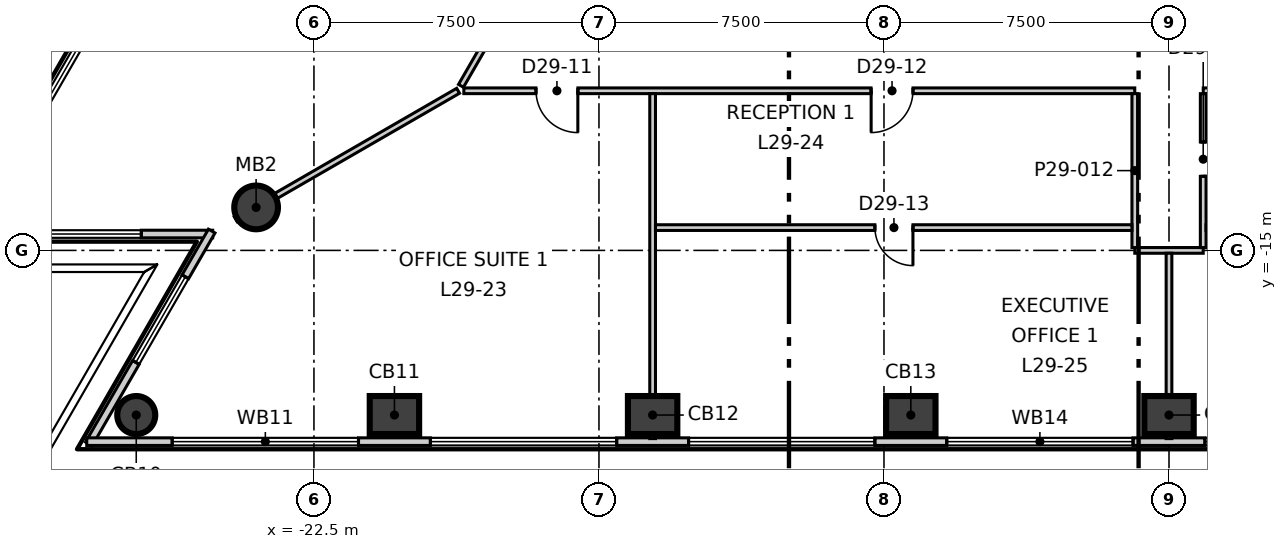
"""IFC4 building model, lengths in metres.
Left out: names, types, materials, properties, quantities, classifications, styles, units other than length and angle.
Written with IfcOpenShell. Run it as: python <this file> out.ifc"""

import sys

from ifc_helpers import new_model, si_unit, direction, frame, frame_2d, origin, origin_2d, place, context, subcontext, project, spatial, rectangle, circle, extrude, element, fill, save


model = new_model("IFC4")
c1 = context("Model", 3, precision=1e-05, world=origin(), true_north=direction((0.0, 1.0)))
c2 = subcontext(c1, "Body", "Model", "MODEL_VIEW")
j1 = project(units=[si_unit("LENGTHUNIT", "METRE"), si_unit("PLANEANGLEUNIT", "RADIAN")], contexts=[c1])
p1 = place(None, origin())
s1 = spatial("IfcSite", under=j1, at=p1, CompositionType="ELEMENT")
p2 = place(p1, origin())
s2 = spatial("IfcBuilding", under=s1, at=p2, CompositionType="ELEMENT")
p3 = place(p2, frame((0.0, 0.0, 128.3)))
s3 = spatial("IfcBuildingStorey", under=s2, at=p3, CompositionType="ELEMENT", Elevation=128.3)
p4 = place(p3, frame((-27.176, -19.332, -0.3), z_axis=(0.0, 0.0, 1.0), x_axis=(1.0, 0.0, 0.0)))
e1 = element("IfcColumn", 1, at=p4, inside=s3, PredefinedType="COLUMN", context=c2, shape_type="SweptSolid", body=[
    extrude(circle(Radius=0.5, at=origin_2d()), origin(), (0.0, 0.0, 1.0), 4.0),
])
for number, where, z_axis, x_axis in (
    (2, (-20.382, -19.332, -0.3), (0.0, 0.0, 1.0), (1.0, 0.0, 0.0)),
    (3, (-13.588, -19.332, -0.3), (0.0, 0.0, 1.0), (1.0, 0.0, 0.0)),
    (4, (-6.794, -19.332, -0.3), (0.0, 0.0, 1.0), (1.0, 0.0, 0.0)),
    (5, (0.0, -19.332, -0.3), (0.0, 0.0, 1.0), (1.0, 0.0, 0.0)),
):
    element("IfcColumn", number, at=place(p3, frame(where, z_axis=z_axis, x_axis=x_axis)), inside=s3, PredefinedType="COLUMN", context=c2, shape_type="SweptSolid", body=[
        extrude(rectangle(XDim=1.3, YDim=1.0, at=origin_2d()), origin(), (0.0, 0.0, 1.0), 4.0),
    ])
p5 = place(p3, frame((-24.022, -13.869, -0.3), z_axis=(0.0, 0.0, 1.0), x_axis=(1.0, 0.0, 0.0)))
e6 = element("IfcColumn", 6, at=p5, inside=s3, PredefinedType="COLUMN", context=c2, shape_type="SweptSolid", body=[
    extrude(circle(Radius=0.575, at=origin_2d()), origin(), (0.0, 0.0, 1.0), 4.0),
])
p6 = place(p3, frame((-3.109, 34.679, 0.0), z_axis=(0.0, 0.0, 1.0), x_axis=(-0.50000689325, -0.866021423928, 0.0)))
e7 = element("IfcWall", 7, at=p6, inside=s3, PredefinedType="ELEMENTEDWALL", context=c2, shape_type="SweptSolid", body=[
    extrude(rectangle(XDim=56.937, YDim=0.2, at=frame_2d((28.469, 0.0))), origin(), (0.0, 0.0, 1.0), 3.7),
])
p7 = place(p6, frame((2.249, 0.0, 0.9)))
e8 = element("IfcOpeningElement", 8, at=p7, cuts=e7, PredefinedType="OPENING", context=c2, shape_type="SweptSolid", body=[
    extrude(rectangle(XDim=4.9, YDim=2.5, at=frame_2d((2.45, 1.25))), frame((0.0, 0.11, 0.0), z_axis=(0.0, -1.0, 0.0), x_axis=(1.0, 0.0, 0.0)), (0.0, 0.0, 1.0), 0.22),
])
p8 = place(p6, frame((9.043, 0.0, 0.9)))
e9 = element("IfcOpeningElement", 9, at=p8, cuts=e7, PredefinedType="OPENING", context=c2, shape_type="SweptSolid", body=[
    extrude(rectangle(XDim=4.9, YDim=2.5, at=frame_2d((2.45, 1.25))), frame((0.0, 0.11, 0.0), z_axis=(0.0, -1.0, 0.0), x_axis=(1.0, 0.0, 0.0)), (0.0, 0.0, 1.0), 0.22),
])
p9 = place(p6, frame((15.837, 0.0, 0.9)))
e10 = element("IfcOpeningElement", 10, at=p9, cuts=e7, PredefinedType="OPENING", context=c2, shape_type="SweptSolid", body=[
    extrude(rectangle(XDim=4.9, YDim=2.5, at=frame_2d((2.45, 1.25))), frame((0.0, 0.11, 0.0), z_axis=(0.0, -1.0, 0.0), x_axis=(1.0, 0.0, 0.0)), (0.0, 0.0, 1.0), 0.22),
])
p10 = place(p6, frame((22.631, 0.0, 0.9)))
e11 = element("IfcOpeningElement", 11, at=p10, cuts=e7, PredefinedType="OPENING", context=c2, shape_type="SweptSolid", body=[
    extrude(rectangle(XDim=4.9, YDim=2.5, at=frame_2d((2.45, 1.25))), frame((0.0, 0.11, 0.0), z_axis=(0.0, -1.0, 0.0), x_axis=(1.0, 0.0, 0.0)), (0.0, 0.0, 1.0), 0.22),
])
p11 = place(p6, frame((29.425, 0.0, 0.9)))
e12 = element("IfcOpeningElement", 12, at=p11, cuts=e7, PredefinedType="OPENING", context=c2, shape_type="SweptSolid", body=[
    extrude(rectangle(XDim=4.9, YDim=2.5, at=frame_2d((2.45, 1.25))), frame((0.0, 0.11, 0.0), z_axis=(0.0, -1.0, 0.0), x_axis=(1.0, 0.0, 0.0)), (0.0, 0.0, 1.0), 0.22),
])
p12 = place(p6, frame((36.219, 0.0, 0.9)))
e13 = element("IfcOpeningElement", 13, at=p12, cuts=e7, PredefinedType="OPENING", context=c2, shape_type="SweptSolid", body=[
    extrude(rectangle(XDim=4.9, YDim=2.5, at=frame_2d((2.45, 1.25))), frame((0.0, 0.11, 0.0), z_axis=(0.0, -1.0, 0.0), x_axis=(1.0, 0.0, 0.0)), (0.0, 0.0, 1.0), 0.22),
])
p13 = place(p6, frame((43.013, 0.0, 0.9)))
e14 = element("IfcOpeningElement", 14, at=p13, cuts=e7, PredefinedType="OPENING", context=c2, shape_type="SweptSolid", body=[
    extrude(rectangle(XDim=4.9, YDim=2.5, at=frame_2d((2.45, 1.25))), frame((0.0, 0.11, 0.0), z_axis=(0.0, -1.0, 0.0), x_axis=(1.0, 0.0, 0.0)), (0.0, 0.0, 1.0), 0.22),
])
p14 = place(p6, frame((49.807, 0.0, 0.9)))
e15 = element("IfcOpeningElement", 15, at=p14, cuts=e7, PredefinedType="OPENING", context=c2, shape_type="SweptSolid", body=[
    extrude(rectangle(XDim=4.9, YDim=2.5, at=frame_2d((2.45, 1.25))), frame((0.0, 0.11, 0.0), z_axis=(0.0, -1.0, 0.0), x_axis=(1.0, 0.0, 0.0)), (0.0, 0.0, 1.0), 0.22),
])
p15 = place(p3, frame((-31.633, -14.569, 0.0), z_axis=(0.0, 0.0, 1.0), x_axis=(1.0, 0.0, 0.0)))
e16 = element("IfcWall", 16, at=p15, inside=s3, PredefinedType="ELEMENTEDWALL", context=c2, shape_type="SweptSolid", body=[
    extrude(rectangle(XDim=6.468, YDim=0.2, at=frame_2d((3.234, 0.0))), origin(), (0.0, 0.0, 1.0), 3.7),
])
p16 = place(p15, frame((1.99, 0.0, 0.9)))
e17 = element("IfcOpeningElement", 17, at=p16, cuts=e16, PredefinedType="OPENING", context=c2, shape_type="SweptSolid", body=[
    extrude(rectangle(XDim=2.6, YDim=2.5, at=frame_2d((1.3, 1.25))), frame((0.0, 0.11, 0.0), z_axis=(0.0, -1.0, 0.0), x_axis=(1.0, 0.0, 0.0)), (0.0, 0.0, 1.0), 0.22),
])
p17 = place(p3, frame((-25.19, -14.491, 0.0), z_axis=(0.0, 0.0, 1.0), x_axis=(-0.499975110204, -0.866039773438, 0.0)))
e18 = element("IfcWall", 18, at=p17, inside=s3, PredefinedType="ELEMENTEDWALL", context=c2, shape_type="SweptSolid", body=[
    extrude(rectangle(XDim=6.469, YDim=0.2, at=frame_2d((3.234, 0.0))), origin(), (0.0, 0.0, 1.0), 3.7),
])
p18 = place(p17, frame((1.39, 0.0, 0.9)))
e19 = element("IfcOpeningElement", 19, at=p18, cuts=e18, PredefinedType="OPENING", context=c2, shape_type="SweptSolid", body=[
    extrude(rectangle(XDim=2.6, YDim=2.5, at=frame_2d((1.3, 1.25))), frame((0.0, 0.11, 0.0), z_axis=(0.0, -1.0, 0.0), x_axis=(1.0, 0.0, 0.0)), (0.0, 0.0, 1.0), 0.22),
])
p19 = place(p3, frame((-28.479, -20.032, 0.0), z_axis=(0.0, 0.0, 1.0), x_axis=(1.0, 0.0, 0.0)))
e20 = element("IfcWall", 20, at=p19, inside=s3, PredefinedType="ELEMENTEDWALL", context=c2, shape_type="SweptSolid", body=[
    extrude(rectangle(XDim=56.938, YDim=0.2, at=frame_2d((28.469, 0.0))), origin(), (0.0, 0.0, 1.0), 3.7),
])
p20 = place(p19, frame((2.25, 0.0, 0.9)))
e21 = element("IfcOpeningElement", 21, at=p20, cuts=e20, PredefinedType="OPENING", context=c2, shape_type="SweptSolid", body=[
    extrude(rectangle(XDim=4.9, YDim=2.5, at=frame_2d((2.45, 1.25))), frame((0.0, 0.11, 0.0), z_axis=(0.0, -1.0, 0.0), x_axis=(1.0, 0.0, 0.0)), (0.0, 0.0, 1.0), 0.22),
])
p21 = place(p19, frame((9.044, 0.0, 0.9)))
e22 = element("IfcOpeningElement", 22, at=p21, cuts=e20, PredefinedType="OPENING", context=c2, shape_type="SweptSolid", body=[
    extrude(rectangle(XDim=4.9, YDim=2.5, at=frame_2d((2.45, 1.25))), frame((0.0, 0.11, 0.0), z_axis=(0.0, -1.0, 0.0), x_axis=(1.0, 0.0, 0.0)), (0.0, 0.0, 1.0), 0.22),
])
p22 = place(p19, frame((15.838, 0.0, 0.9)))
e23 = element("IfcOpeningElement", 23, at=p22, cuts=e20, PredefinedType="OPENING", context=c2, shape_type="SweptSolid", body=[
    extrude(rectangle(XDim=4.9, YDim=2.5, at=frame_2d((2.45, 1.25))), frame((0.0, 0.11, 0.0), z_axis=(0.0, -1.0, 0.0), x_axis=(1.0, 0.0, 0.0)), (0.0, 0.0, 1.0), 0.22),
])
p23 = place(p19, frame((22.632, 0.0, 0.9)))
e24 = element("IfcOpeningElement", 24, at=p23, cuts=e20, PredefinedType="OPENING", context=c2, shape_type="SweptSolid", body=[
    extrude(rectangle(XDim=4.9, YDim=2.5, at=frame_2d((2.45, 1.25))), frame((0.0, 0.11, 0.0), z_axis=(0.0, -1.0, 0.0), x_axis=(1.0, 0.0, 0.0)), (0.0, 0.0, 1.0), 0.22),
])
p24 = place(p19, frame((29.426, 0.0, 0.9)))
e25 = element("IfcOpeningElement", 25, at=p24, cuts=e20, PredefinedType="OPENING", context=c2, shape_type="SweptSolid", body=[
    extrude(rectangle(XDim=4.9, YDim=2.5, at=frame_2d((2.45, 1.25))), frame((0.0, 0.11, 0.0), z_axis=(0.0, -1.0, 0.0), x_axis=(1.0, 0.0, 0.0)), (0.0, 0.0, 1.0), 0.22),
])
p25 = place(p19, frame((36.22, 0.0, 0.9)))
e26 = element("IfcOpeningElement", 26, at=p25, cuts=e20, PredefinedType="OPENING", context=c2, shape_type="SweptSolid", body=[
    extrude(rectangle(XDim=4.9, YDim=2.5, at=frame_2d((2.45, 1.25))), frame((0.0, 0.11, 0.0), z_axis=(0.0, -1.0, 0.0), x_axis=(1.0, 0.0, 0.0)), (0.0, 0.0, 1.0), 0.22),
])
p26 = place(p19, frame((43.014, 0.0, 0.9)))
e27 = element("IfcOpeningElement", 27, at=p26, cuts=e20, PredefinedType="OPENING", context=c2, shape_type="SweptSolid", body=[
    extrude(rectangle(XDim=4.9, YDim=2.5, at=frame_2d((2.45, 1.25))), frame((0.0, 0.11, 0.0), z_axis=(0.0, -1.0, 0.0), x_axis=(1.0, 0.0, 0.0)), (0.0, 0.0, 1.0), 0.22),
])
p27 = place(p19, frame((49.808, 0.0, 0.9)))
e28 = element("IfcOpeningElement", 28, at=p27, cuts=e20, PredefinedType="OPENING", context=c2, shape_type="SweptSolid", body=[
    extrude(rectangle(XDim=4.9, YDim=2.5, at=frame_2d((2.45, 1.25))), frame((0.0, 0.11, 0.0), z_axis=(0.0, -1.0, 0.0), x_axis=(1.0, 0.0, 0.0)), (0.0, 0.0, 1.0), 0.22),
])
p28 = place(p3, frame((-24.559, -14.179, 0.0), z_axis=(0.0, 0.0, 1.0), x_axis=(0.866047229553, 0.499962194753, 0.0)))
e29 = element("IfcWall", 29, at=p28, inside=s3, PredefinedType="PARTITIONING", context=c2, shape_type="SweptSolid", body=[
    extrude(rectangle(XDim=6.758, YDim=0.15, at=frame_2d((3.379, 0.0))), origin(), (0.0, 0.0, 1.0), 3.15),
])
p29 = place(p3, frame((-18.556, -10.8, 0.0), z_axis=(0.0, 0.0, 1.0), x_axis=(1.0, 0.0, 0.0)))
e30 = element("IfcWall", 30, at=p29, inside=s3, PredefinedType="PARTITIONING", context=c2, shape_type="SweptSolid", body=[
    extrude(rectangle(XDim=17.655, YDim=0.15, at=frame_2d((8.828, 0.0))), origin(), (0.0, 0.0, 1.0), 3.7),
])
p30 = place(p29, frame((1.9, 0.0, 0.0)))
e31 = element("IfcOpeningElement", 31, at=p30, cuts=e30, PredefinedType="OPENING", context=c2, shape_type="SweptSolid", body=[
    extrude(rectangle(XDim=1.1, YDim=2.1, at=frame_2d((0.55, 1.05))), frame((0.0, 0.085, 0.0), z_axis=(0.0, -1.0, 0.0), x_axis=(1.0, 0.0, 0.0)), (0.0, 0.0, 1.0), 0.17),
])
p31 = place(p29, frame((10.718, 0.0, 0.0)))
e32 = element("IfcOpeningElement", 32, at=p31, cuts=e30, PredefinedType="OPENING", context=c2, shape_type="SweptSolid", body=[
    extrude(rectangle(XDim=1.1, YDim=2.1, at=frame_2d((0.55, 1.05))), frame((0.0, 0.085, 0.0), z_axis=(0.0, -1.0, 0.0), x_axis=(1.0, 0.0, 0.0)), (0.0, 0.0, 1.0), 0.17),
])
p32 = place(p3, frame((0.901, -10.8, 0.0), z_axis=(0.0, 0.0, 1.0), x_axis=(1.0, 0.0, 0.0)))
e33 = element("IfcWall", 33, at=p32, inside=s3, PredefinedType="PARTITIONING", context=c2, shape_type="SweptSolid", body=[
    extrude(rectangle(XDim=17.805, YDim=0.15, at=frame_2d((8.903, 0.0))), origin(), (0.0, 0.0, 1.0), 3.7),
])
p33 = place(p32, frame((10.149, 0.0, 0.0)))
e34 = element("IfcOpeningElement", 34, at=p33, cuts=e33, PredefinedType="OPENING", context=c2, shape_type="SweptSolid", body=[
    extrude(rectangle(XDim=1.1, YDim=2.1, at=frame_2d((0.55, 1.05))), frame((0.0, 0.085, 0.0), z_axis=(0.0, -1.0, 0.0), x_axis=(1.0, 0.0, 0.0)), (0.0, 0.0, 1.0), 0.17),
])
p34 = place(p32, frame((4.349, 0.0, 0.0)))
e35 = element("IfcOpeningElement", 35, at=p34, cuts=e33, PredefinedType="OPENING", context=c2, shape_type="SweptSolid", body=[
    extrude(rectangle(XDim=0.9, YDim=2.1, at=frame_2d((0.45, 1.05))), frame((0.0, 0.085, 0.0), z_axis=(0.0, -1.0, 0.0), x_axis=(1.0, 0.0, 0.0)), (0.0, 0.0, 1.0), 0.17),
])
p35 = place(p32, frame((7.149, 0.0, 0.0)))
e36 = element("IfcOpeningElement", 36, at=p35, cuts=e33, PredefinedType="OPENING", context=c2, shape_type="SweptSolid", body=[
    extrude(rectangle(XDim=1.0, YDim=2.1, at=frame_2d((0.5, 1.05))), frame((0.0, 0.085, 0.0), z_axis=(0.0, -1.0, 0.0), x_axis=(1.0, 0.0, 0.0)), (0.0, 0.0, 1.0), 0.17),
])
p36 = place(p32, frame((14.737, 0.0, 0.0)))
e37 = element("IfcOpeningElement", 37, at=p36, cuts=e33, PredefinedType="OPENING", context=c2, shape_type="SweptSolid", body=[
    extrude(rectangle(XDim=1.1, YDim=2.1, at=frame_2d((0.55, 1.05))), frame((0.0, 0.085, 0.0), z_axis=(0.0, -1.0, 0.0), x_axis=(1.0, 0.0, 0.0)), (0.0, 0.0, 1.0), 0.17),
])
p37 = place(p3, frame((-18.631, -10.67, 0.0), z_axis=(0.0, 0.0, 1.0), x_axis=(0.499976222121, 0.866039131514, 0.0)))
e38 = element("IfcWall", 38, at=p37, inside=s3, PredefinedType="PARTITIONING", context=c2, shape_type="SweptSolid", body=[
    extrude(rectangle(XDim=17.655, YDim=0.15, at=frame_2d((8.828, 0.0))), origin(), (0.0, 0.0, 1.0), 3.7),
])
p38 = place(p37, frame((14.206, 0.0, 0.0)))
e39 = element("IfcOpeningElement", 39, at=p38, cuts=e38, PredefinedType="OPENING", context=c2, shape_type="SweptSolid", body=[
    extrude(rectangle(XDim=1.0, YDim=2.1, at=frame_2d((0.5, 1.05))), frame((0.0, 0.085, 0.0), z_axis=(0.0, -1.0, 0.0), x_axis=(1.0, 0.0, 0.0)), (0.0, 0.0, 1.0), 0.17),
])
p39 = place(p37, frame((7.912, 0.0, 0.0)))
e40 = element("IfcOpeningElement", 40, at=p39, cuts=e38, PredefinedType="OPENING", context=c2, shape_type="SweptSolid", body=[
    extrude(rectangle(XDim=1.0, YDim=2.1, at=frame_2d((0.5, 1.05))), frame((0.0, 0.085, 0.0), z_axis=(0.0, -1.0, 0.0), x_axis=(1.0, 0.0, 0.0)), (0.0, 0.0, 1.0), 0.17),
])
p40 = place(p37, frame((1.818, 0.0, 0.0)))
e41 = element("IfcOpeningElement", 41, at=p40, cuts=e38, PredefinedType="OPENING", context=c2, shape_type="SweptSolid", body=[
    extrude(rectangle(XDim=1.1, YDim=2.1, at=frame_2d((0.55, 1.05))), frame((0.0, 0.085, 0.0), z_axis=(0.0, -1.0, 0.0), x_axis=(1.0, 0.0, 0.0)), (0.0, 0.0, 1.0), 0.17),
])
p41 = place(p3, frame((-13.588, -19.952, 0.0), z_axis=(0.0, 0.0, 1.0), x_axis=(0.0, 1.0, 0.0)))
e42 = element("IfcWall", 42, at=p41, inside=s3, PredefinedType="PARTITIONING", context=c2, shape_type="SweptSolid", body=[
    extrude(rectangle(XDim=9.077, YDim=0.15, at=frame_2d((4.539, 0.0))), origin(), (0.0, 0.0, 1.0), 3.7),
])
p42 = place(p3, frame((-0.9, -15.0, 0.0), z_axis=(0.0, 0.0, 1.0), x_axis=(1.0, 0.0, 0.0)))
e43 = element("IfcWall", 43, at=p42, inside=s3, PredefinedType="PARTITIONING", context=c2, shape_type="SweptSolid", body=[
    extrude(rectangle(XDim=1.8, YDim=0.15, at=frame_2d((0.9, 0.0))), origin(), (0.0, 0.0, 1.0), 3.7),
])
p43 = place(p3, frame((-0.9, -14.925, 0.0), z_axis=(0.0, 0.0, 1.0), x_axis=(0.0, 1.0, 0.0)))
e44 = element("IfcWall", 44, at=p43, inside=s3, PredefinedType="PARTITIONING", context=c2, shape_type="SweptSolid", body=[
    extrude(rectangle(XDim=4.049, YDim=0.15, at=frame_2d((2.024, 0.0))), origin(), (0.0, 0.0, 1.0), 3.7),
])
p44 = place(p3, frame((0.0, -19.952, 0.0), z_axis=(0.0, 0.0, 1.0), x_axis=(0.0, 1.0, 0.0)))
e45 = element("IfcWall", 45, at=p44, inside=s3, PredefinedType="PARTITIONING", context=c2, shape_type="SweptSolid", body=[
    extrude(rectangle(XDim=4.877, YDim=0.15, at=frame_2d((2.438, 0.0))), origin(), (0.0, 0.0, 1.0), 3.2),
])
p45 = place(p3, frame((0.9, -14.925, 0.0), z_axis=(0.0, 0.0, 1.0), x_axis=(0.0, 1.0, 0.0)))
e46 = element("IfcWall", 46, at=p45, inside=s3, PredefinedType="PARTITIONING", context=c2, shape_type="SweptSolid", body=[
    extrude(rectangle(XDim=4.049, YDim=0.15, at=frame_2d((2.024, 0.0))), origin(), (0.0, 0.0, 1.0), 3.7),
])
p46 = place(p45, frame((1.875, 0.0, 0.0)))
e47 = element("IfcOpeningElement", 47, at=p46, cuts=e46, PredefinedType="OPENING", context=c2, shape_type="SweptSolid", body=[
    extrude(rectangle(XDim=0.9, YDim=2.1, at=frame_2d((0.45, 1.05))), frame((0.0, 0.085, 0.0), z_axis=(0.0, -1.0, 0.0), x_axis=(1.0, 0.0, 0.0)), (0.0, 0.0, 1.0), 0.17),
])
p47 = place(p3, frame((0.975, -14.4, 0.0), z_axis=(0.0, 0.0, 1.0), x_axis=(1.0, 0.0, 0.0)))
e48 = element("IfcWall", 48, at=p47, inside=s3, PredefinedType="PARTITIONING", context=c2, shape_type="SweptSolid", body=[
    extrude(rectangle(XDim=8.725, YDim=0.15, at=frame_2d((4.362, 0.0))), origin(), (0.0, 0.0, 1.0), 3.7),
])
p48 = place(p3, frame((-13.513, -14.4, 0.0), z_axis=(0.0, 0.0, 1.0), x_axis=(1.0, 0.0, 0.0)))
e49 = element("IfcWall", 49, at=p48, inside=s3, PredefinedType="PARTITIONING", context=c2, shape_type="SweptSolid", body=[
    extrude(rectangle(XDim=12.538, YDim=0.15, at=frame_2d((6.269, 0.0))), origin(), (0.0, 0.0, 1.0), 3.7),
])
p49 = place(p48, frame((5.775, 0.0, 0.0)))
e50 = element("IfcOpeningElement", 50, at=p49, cuts=e49, PredefinedType="OPENING", context=c2, shape_type="SweptSolid", body=[
    extrude(rectangle(XDim=1.0, YDim=2.1, at=frame_2d((0.5, 1.05))), frame((0.0, 0.085, 0.0), z_axis=(0.0, -1.0, 0.0), x_axis=(1.0, 0.0, 0.0)), (0.0, 0.0, 1.0), 0.17),
])
p50 = place(p14, origin())
e51 = element("IfcWindow", 51, at=p50, inside=s3, PartitioningType="SINGLE_PANEL", PredefinedType="WINDOW", context=c2, shape_type="SweptSolid", body=[
    extrude(rectangle(XDim=4.9, YDim=2.5, at=frame_2d((2.45, 1.25))), frame((0.0, 0.03, 0.0), z_axis=(0.0, -1.0, 0.0), x_axis=(1.0, 0.0, 0.0)), (0.0, 0.0, 1.0), 0.06),
])
fill(e15, e51)
p51 = place(p16, origin())
e52 = element("IfcWindow", 52, at=p51, inside=s3, PartitioningType="SINGLE_PANEL", PredefinedType="WINDOW", context=c2, shape_type="SweptSolid", body=[
    extrude(rectangle(XDim=2.6, YDim=2.5, at=frame_2d((1.3, 1.25))), frame((0.0, 0.03, 0.0), z_axis=(0.0, -1.0, 0.0), x_axis=(1.0, 0.0, 0.0)), (0.0, 0.0, 1.0), 0.06),
])
fill(e17, e52)
p52 = place(p18, origin())
e53 = element("IfcWindow", 53, at=p52, inside=s3, PartitioningType="SINGLE_PANEL", PredefinedType="WINDOW", context=c2, shape_type="SweptSolid", body=[
    extrude(rectangle(XDim=2.6, YDim=2.5, at=frame_2d((1.3, 1.25))), frame((0.0, 0.03, 0.0), z_axis=(0.0, -1.0, 0.0), x_axis=(1.0, 0.0, 0.0)), (0.0, 0.0, 1.0), 0.06),
])
fill(e19, e53)
p53 = place(p20, origin())
e54 = element("IfcWindow", 54, at=p53, inside=s3, PartitioningType="SINGLE_PANEL", PredefinedType="WINDOW", context=c2, shape_type="SweptSolid", body=[
    extrude(rectangle(XDim=4.9, YDim=2.5, at=frame_2d((2.45, 1.25))), frame((0.0, 0.03, 0.0), z_axis=(0.0, -1.0, 0.0), x_axis=(1.0, 0.0, 0.0)), (0.0, 0.0, 1.0), 0.06),
])
fill(e21, e54)
p54 = place(p21, origin())
e55 = element("IfcWindow", 55, at=p54, inside=s3, PartitioningType="SINGLE_PANEL", PredefinedType="WINDOW", context=c2, shape_type="SweptSolid", body=[
    extrude(rectangle(XDim=4.9, YDim=2.5, at=frame_2d((2.45, 1.25))), frame((0.0, 0.03, 0.0), z_axis=(0.0, -1.0, 0.0), x_axis=(1.0, 0.0, 0.0)), (0.0, 0.0, 1.0), 0.06),
])
fill(e22, e55)
p55 = place(p22, origin())
e56 = element("IfcWindow", 56, at=p55, inside=s3, PartitioningType="SINGLE_PANEL", PredefinedType="WINDOW", context=c2, shape_type="SweptSolid", body=[
    extrude(rectangle(XDim=4.9, YDim=2.5, at=frame_2d((2.45, 1.25))), frame((0.0, 0.03, 0.0), z_axis=(0.0, -1.0, 0.0), x_axis=(1.0, 0.0, 0.0)), (0.0, 0.0, 1.0), 0.06),
])
fill(e23, e56)
p56 = place(p23, origin())
e57 = element("IfcWindow", 57, at=p56, inside=s3, PartitioningType="SINGLE_PANEL", PredefinedType="WINDOW", context=c2, shape_type="SweptSolid", body=[
    extrude(rectangle(XDim=4.9, YDim=2.5, at=frame_2d((2.45, 1.25))), frame((0.0, 0.03, 0.0), z_axis=(0.0, -1.0, 0.0), x_axis=(1.0, 0.0, 0.0)), (0.0, 0.0, 1.0), 0.06),
])
fill(e24, e57)
p57 = place(p24, origin())
e58 = element("IfcWindow", 58, at=p57, inside=s3, PartitioningType="SINGLE_PANEL", PredefinedType="WINDOW", context=c2, shape_type="SweptSolid", body=[
    extrude(rectangle(XDim=4.9, YDim=2.5, at=frame_2d((2.45, 1.25))), frame((0.0, 0.03, 0.0), z_axis=(0.0, -1.0, 0.0), x_axis=(1.0, 0.0, 0.0)), (0.0, 0.0, 1.0), 0.06),
])
fill(e25, e58)
p58 = place(p30, origin())
e59 = element("IfcDoor", 59, at=p58, inside=s3, OperationType="SINGLE_SWING_RIGHT", PredefinedType="DOOR", context=c2, shape_type="SweptSolid", body=[
    extrude(rectangle(XDim=1.1, YDim=2.1, at=frame_2d((0.55, 1.05))), frame((0.0, 0.025, 0.0), z_axis=(0.0, -1.0, 0.0), x_axis=(1.0, 0.0, 0.0)), (0.0, 0.0, 1.0), 0.05),
])
fill(e31, e59)
p59 = place(p31, origin())
e60 = element("IfcDoor", 60, at=p59, inside=s3, OperationType="SINGLE_SWING_LEFT", PredefinedType="DOOR", context=c2, shape_type="SweptSolid", body=[
    extrude(rectangle(XDim=1.1, YDim=2.1, at=frame_2d((0.55, 1.05))), frame((0.0, 0.025, 0.0), z_axis=(0.0, -1.0, 0.0), x_axis=(1.0, 0.0, 0.0)), (0.0, 0.0, 1.0), 0.05),
])
fill(e32, e60)
p60 = place(p49, origin())
e61 = element("IfcDoor", 61, at=p60, inside=s3, OperationType="SINGLE_SWING_RIGHT", PredefinedType="DOOR", context=c2, shape_type="SweptSolid", body=[
    extrude(rectangle(XDim=1.0, YDim=2.1, at=frame_2d((0.5, 1.05))), frame((0.0, 0.025, 0.0), z_axis=(0.0, -1.0, 0.0), x_axis=(1.0, 0.0, 0.0)), (0.0, 0.0, 1.0), 0.05),
])
fill(e50, e61)
p61 = place(p46, origin())
e62 = element("IfcDoor", 62, at=p61, inside=s3, OperationType="SINGLE_SWING_LEFT", PredefinedType="DOOR", context=c2, shape_type="SweptSolid", body=[
    extrude(rectangle(XDim=0.9, YDim=2.1, at=frame_2d((0.45, 1.05))), frame((0.0, 0.025, 0.0), z_axis=(0.0, -1.0, 0.0), x_axis=(1.0, 0.0, 0.0)), (0.0, 0.0, 1.0), 0.05),
])
fill(e47, e62)
save(model, sys.argv[1])
